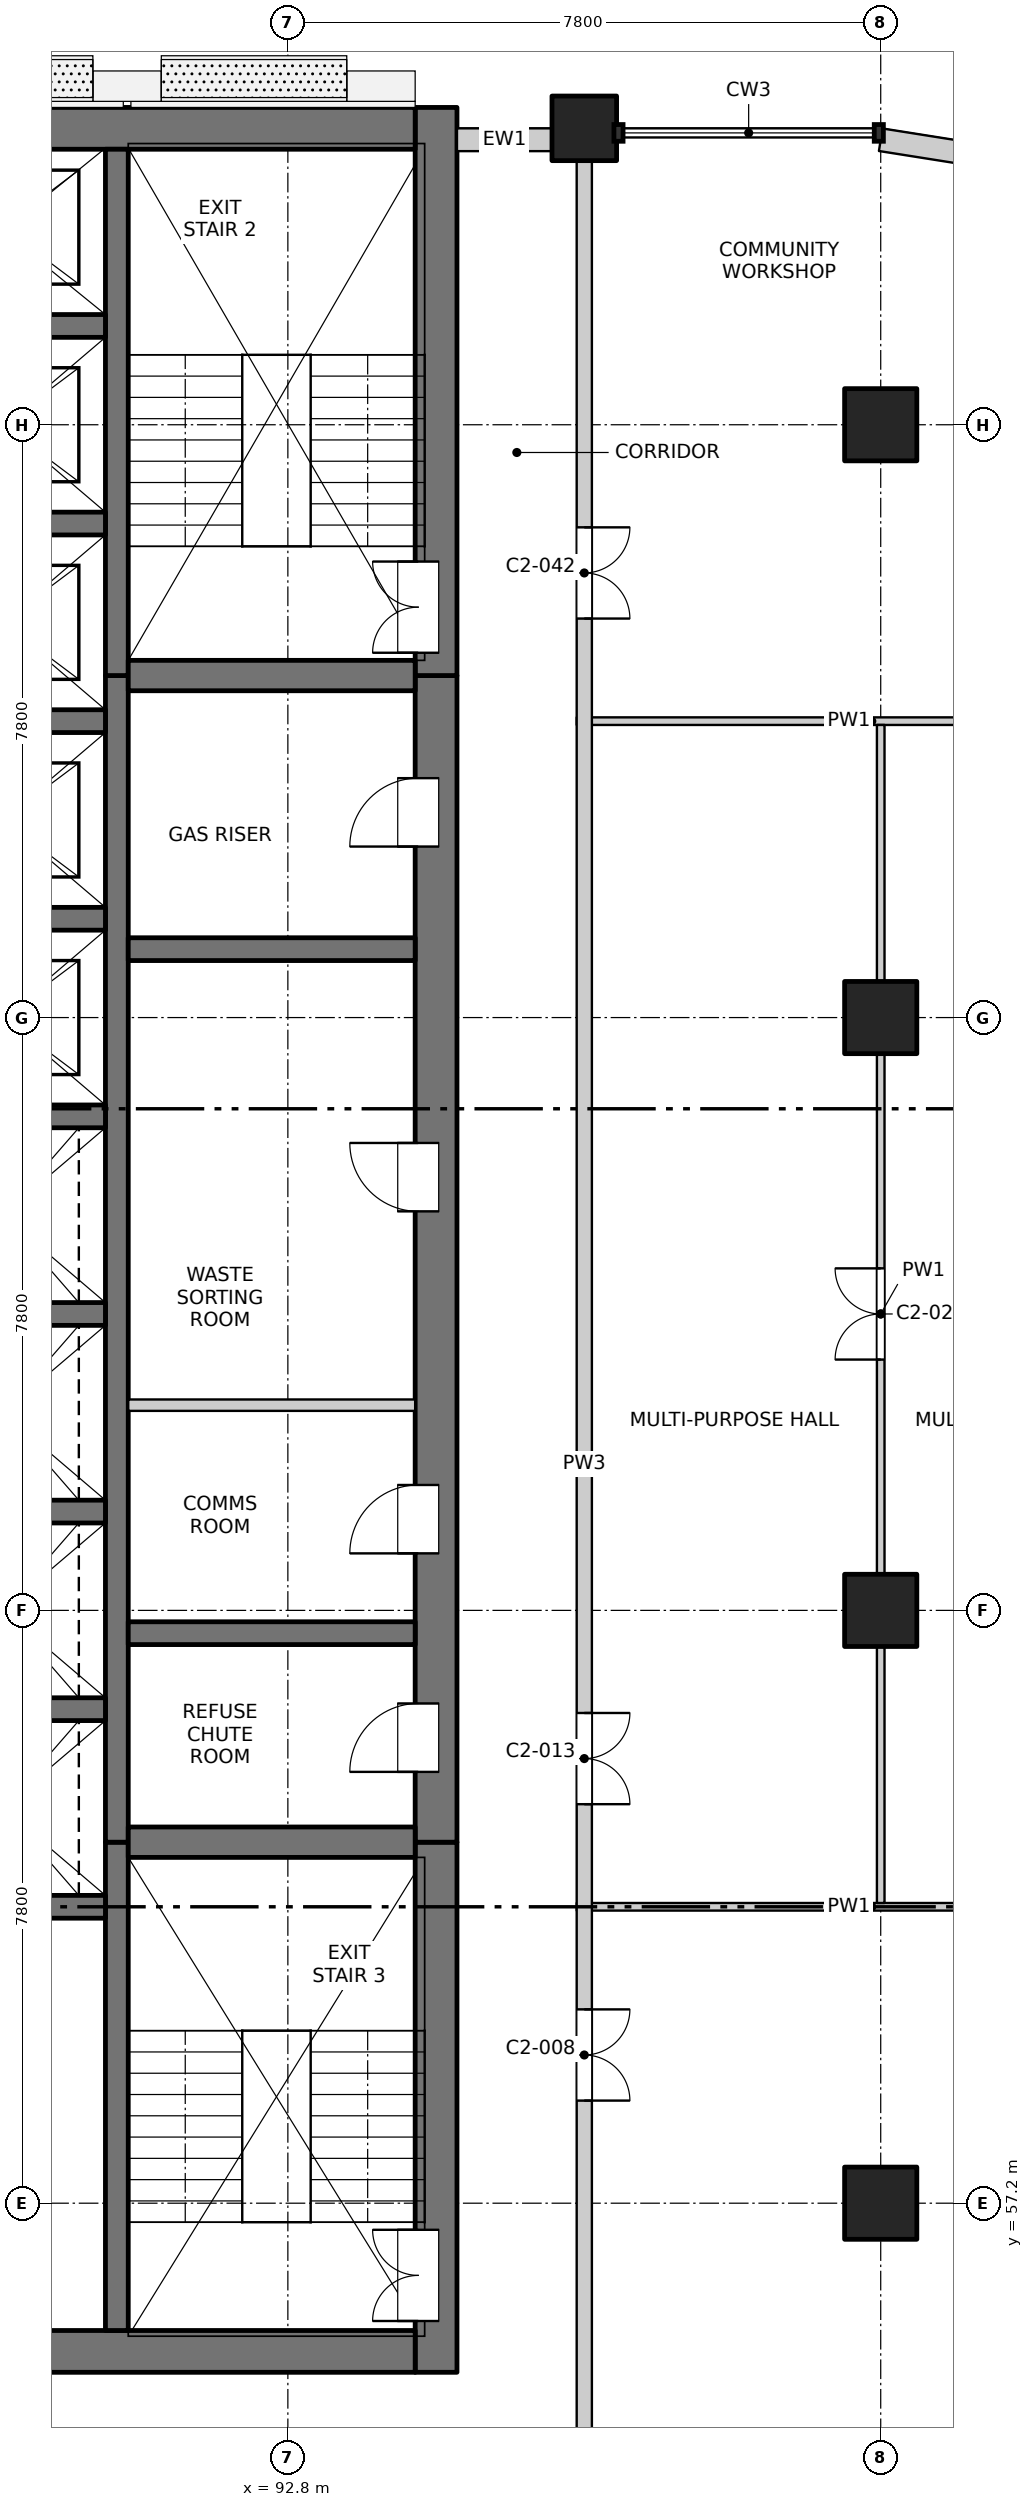
"""IFC4 building model, lengths in metres.
Left out: names, types, materials, properties, quantities, classifications, styles, units other than length and angle.
Written with IfcOpenShell. Run it as: python <this file> out.ifc"""

import sys

from ifc_helpers import new_model, si_unit, direction, frame, frame_2d, origin, origin_2d, place, context, subcontext, project, spatial, rectangle, extrude, element, fill, save


model = new_model("IFC4")
c1 = context("Model", 3, precision=1e-05, world=origin(), true_north=direction((0.0, 1.0)))
c2 = subcontext(c1, "Body", "Model", "MODEL_VIEW")
j1 = project(units=[si_unit("LENGTHUNIT", "METRE"), si_unit("PLANEANGLEUNIT", "RADIAN")], contexts=[c1])
p1 = place(None, origin())
s1 = spatial("IfcSite", under=j1, at=p1, CompositionType="ELEMENT")
p2 = place(p1, origin())
s2 = spatial("IfcBuilding", under=s1, at=p2, CompositionType="ELEMENT")
p3 = place(p2, frame((0.0, 0.0, 133.9)))
s3 = spatial("IfcBuildingStorey", under=s2, at=p3, CompositionType="ELEMENT", Elevation=133.9)
p4 = place(p3, frame((96.7, 84.5, -0.25), z_axis=(0.0, 0.0, 1.0), x_axis=(1.0, 0.0, 0.0)))
e1 = element("IfcColumn", 1, at=p4, inside=s3, PredefinedType="COLUMN", context=c2, shape_type="SweptSolid", body=[
    extrude(rectangle(XDim=0.85, YDim=0.85, at=origin_2d()), origin(), (0.0, 0.0, 1.0), 3.4),
])
for number, where, z_axis, x_axis in (
    (2, (100.6, 57.2, -0.25), (0.0, 0.0, 1.0), (1.0, 0.0, 0.0)),
    (3, (100.6, 65.0, -0.25), (0.0, 0.0, 1.0), (1.0, 0.0, 0.0)),
    (4, (100.6, 72.8, -0.25), (0.0, 0.0, 1.0), (1.0, 0.0, 0.0)),
    (5, (100.6, 80.6, -0.25), (0.0, 0.0, 1.0), (1.0, 0.0, 0.0)),
):
    element("IfcColumn", number, at=place(p3, frame(where, z_axis=z_axis, x_axis=x_axis)), inside=s3, PredefinedType="COLUMN", context=c2, shape_type="SweptSolid", body=[
        extrude(rectangle(XDim=0.95, YDim=0.95, at=origin_2d()), origin(), (0.0, 0.0, 1.0), 3.4),
    ])
p5 = place(p3, frame((94.75, 54.975, -0.25), z_axis=(0.0, 0.0, 1.0), x_axis=(0.0, 1.0, 0.0)))
e6 = element("IfcWall", 6, at=p5, inside=s3, PredefinedType="SOLIDWALL", context=c2, shape_type="SweptSolid", body=[
    extrude(rectangle(XDim=6.975, YDim=0.55, at=frame_2d((3.487, 0.0))), origin(), (0.0, 0.0, 1.0), 3.4),
])
p6 = place(p5, frame((0.675, 0.0, 0.25)))
e7 = element("IfcOpeningElement", 7, at=p6, cuts=e6, PredefinedType="OPENING", context=c2, shape_type="SweptSolid", body=[
    extrude(rectangle(XDim=1.2, YDim=2.1, at=frame_2d((0.6, 1.05))), frame((0.0, 0.285, 0.0), z_axis=(0.0, -1.0, 0.0), x_axis=(1.0, 0.0, 0.0)), (0.0, 0.0, 1.0), 0.57),
])
p7 = place(p3, frame((94.75, 61.95, -0.25), z_axis=(0.0, 0.0, 1.0), x_axis=(0.0, 1.0, 0.0)))
e8 = element("IfcWall", 8, at=p7, inside=s3, PredefinedType="SOLIDWALL", context=c2, shape_type="SweptSolid", body=[
    extrude(rectangle(XDim=15.35, YDim=0.55, at=frame_2d((7.675, 0.0))), origin(), (0.0, 0.0, 1.0), 3.4),
])
p8 = place(p7, frame((0.925, 0.0, 0.25)))
e9 = element("IfcOpeningElement", 9, at=p8, cuts=e8, PredefinedType="OPENING", context=c2, shape_type="SweptSolid", body=[
    extrude(rectangle(XDim=0.9, YDim=2.1, at=frame_2d((0.45, 1.05))), frame((0.0, 0.285, 0.0), z_axis=(0.0, -1.0, 0.0), x_axis=(1.0, 0.0, 0.0)), (0.0, 0.0, 1.0), 0.57),
])
p9 = place(p7, frame((3.8, 0.0, 0.25)))
e10 = element("IfcOpeningElement", 10, at=p9, cuts=e8, PredefinedType="OPENING", context=c2, shape_type="SweptSolid", body=[
    extrude(rectangle(XDim=0.9, YDim=2.1, at=frame_2d((0.45, 1.05))), frame((0.0, 0.285, 0.0), z_axis=(0.0, -1.0, 0.0), x_axis=(1.0, 0.0, 0.0)), (0.0, 0.0, 1.0), 0.57),
])
p10 = place(p7, frame((8.3, 0.0, 0.25)))
e11 = element("IfcOpeningElement", 11, at=p10, cuts=e8, PredefinedType="OPENING", context=c2, shape_type="SweptSolid", body=[
    extrude(rectangle(XDim=0.9, YDim=2.1, at=frame_2d((0.45, 1.05))), frame((0.0, 0.285, 0.0), z_axis=(0.0, -1.0, 0.0), x_axis=(1.0, 0.0, 0.0)), (0.0, 0.0, 1.0), 0.57),
])
p11 = place(p7, frame((13.1, 0.0, 0.25)))
e12 = element("IfcOpeningElement", 12, at=p11, cuts=e8, PredefinedType="OPENING", context=c2, shape_type="SweptSolid", body=[
    extrude(rectangle(XDim=0.9, YDim=2.1, at=frame_2d((0.45, 1.05))), frame((0.0, 0.285, 0.0), z_axis=(0.0, -1.0, 0.0), x_axis=(1.0, 0.0, 0.0)), (0.0, 0.0, 1.0), 0.57),
])
p12 = place(p3, frame((94.75, 77.3, -0.25), z_axis=(0.0, 0.0, 1.0), x_axis=(0.0, 1.0, 0.0)))
e13 = element("IfcWall", 13, at=p12, inside=s3, PredefinedType="SOLIDWALL", context=c2, shape_type="SweptSolid", body=[
    extrude(rectangle(XDim=7.475, YDim=0.55, at=frame_2d((3.737, 0.0))), origin(), (0.0, 0.0, 1.0), 3.4),
])
p13 = place(p12, frame((0.3, 0.0, 0.25)))
e14 = element("IfcOpeningElement", 14, at=p13, cuts=e13, PredefinedType="OPENING", context=c2, shape_type="SweptSolid", body=[
    extrude(rectangle(XDim=1.2, YDim=2.1, at=frame_2d((0.6, 1.05))), frame((0.0, 0.285, 0.0), z_axis=(0.0, -1.0, 0.0), x_axis=(1.0, 0.0, 0.0)), (0.0, 0.0, 1.0), 0.57),
])
p14 = place(p3, frame((75.525, 55.25, -0.25), z_axis=(0.0, 0.0, 1.0), x_axis=(1.0, 0.0, 0.0)))
e15 = element("IfcWall", 15, at=p14, inside=s3, PredefinedType="SOLIDWALL", context=c2, shape_type="SweptSolid", body=[
    extrude(rectangle(XDim=18.95, YDim=0.55, at=frame_2d((9.475, 0.0))), origin(), (0.0, 0.0, 1.0), 3.4),
])
p15 = place(p14, frame((8.725, 0.0, 0.25)))
e16 = element("IfcOpeningElement", 16, at=p15, cuts=e15, PredefinedType="OPENING", context=c2, shape_type="SweptSolid", body=[
    extrude(rectangle(XDim=1.5, YDim=2.1, at=frame_2d((0.75, 1.05))), frame((0.0, 0.285, 0.0), z_axis=(0.0, -1.0, 0.0), x_axis=(1.0, 0.0, 0.0)), (0.0, 0.0, 1.0), 0.57),
])
p16 = place(p3, frame((75.525, 84.5, -0.25), z_axis=(0.0, 0.0, 1.0), x_axis=(1.0, 0.0, 0.0)))
e17 = element("IfcWall", 17, at=p16, inside=s3, PredefinedType="SOLIDWALL", context=c2, shape_type="SweptSolid", body=[
    extrude(rectangle(XDim=18.95, YDim=0.55, at=frame_2d((9.475, 0.0))), origin(), (0.0, 0.0, 1.0), 3.4),
])
p17 = place(p3, frame((90.55, 55.525, -0.25), z_axis=(0.0, 0.0, 1.0), x_axis=(0.0, 1.0, 0.0)))
e18 = element("IfcWall", 18, at=p17, inside=s3, PredefinedType="SOLIDWALL", context=c2, shape_type="SweptSolid", body=[
    extrude(rectangle(XDim=6.425, YDim=0.3, at=frame_2d((3.212, 0.0))), origin(), (0.0, 0.0, 1.0), 3.4),
])
p18 = place(p3, frame((90.55, 61.95, -0.25), z_axis=(0.0, 0.0, 1.0), x_axis=(0.0, 1.0, 0.0)))
e19 = element("IfcWall", 19, at=p18, inside=s3, PredefinedType="SOLIDWALL", context=c2, shape_type="SweptSolid", body=[
    extrude(rectangle(XDim=15.35, YDim=0.3, at=frame_2d((7.675, 0.0))), origin(), (0.0, 0.0, 1.0), 3.4),
])
p19 = place(p3, frame((90.55, 77.3, -0.25), z_axis=(0.0, 0.0, 1.0), x_axis=(0.0, 1.0, 0.0)))
e20 = element("IfcWall", 20, at=p19, inside=s3, PredefinedType="SOLIDWALL", context=c2, shape_type="SweptSolid", body=[
    extrude(rectangle(XDim=6.925, YDim=0.3, at=frame_2d((3.462, 0.0))), origin(), (0.0, 0.0, 1.0), 3.4),
])
for number, where, z_axis, x_axis in (
    (21, (87.4, 61.1, -0.25), (0.0, 0.0, 1.0), (1.0, 0.0, 0.0)),
    (22, (87.4, 63.7, -0.25), (0.0, 0.0, 1.0), (1.0, 0.0, 0.0)),
    (23, (87.4, 66.3, -0.25), (0.0, 0.0, 1.0), (1.0, 0.0, 0.0)),
    (24, (87.4, 68.9, -0.25), (0.0, 0.0, 1.0), (1.0, 0.0, 0.0)),
    (25, (87.4, 71.5, -0.25), (0.0, 0.0, 1.0), (1.0, 0.0, 0.0)),
    (26, (87.4, 74.1, -0.25), (0.0, 0.0, 1.0), (1.0, 0.0, 0.0)),
    (27, (87.4, 76.7, -0.25), (0.0, 0.0, 1.0), (1.0, 0.0, 0.0)),
    (28, (87.4, 79.3, -0.25), (0.0, 0.0, 1.0), (1.0, 0.0, 0.0)),
    (29, (87.4, 81.9, -0.25), (0.0, 0.0, 1.0), (1.0, 0.0, 0.0)),
):
    element("IfcWall", number, at=place(p3, frame(where, z_axis=z_axis, x_axis=x_axis)), inside=s3, PredefinedType="SOLIDWALL", context=c2, shape_type="SweptSolid", body=[
        extrude(rectangle(XDim=3.0, YDim=0.3, at=frame_2d((1.5, 0.0))), origin(), (0.0, 0.0, 1.0), 3.4),
    ])
p20 = place(p3, frame((90.7, 61.95, -0.25), z_axis=(0.0, 0.0, 1.0), x_axis=(1.0, 0.0, 0.0)))
e30 = element("IfcWall", 30, at=p20, inside=s3, PredefinedType="SOLIDWALL", context=c2, shape_type="SweptSolid", body=[
    extrude(rectangle(XDim=3.775, YDim=0.4, at=frame_2d((1.888, 0.0))), origin(), (0.0, 0.0, 1.0), 3.4),
])
for number, where, z_axis, x_axis in (
    (31, (90.7, 64.7, -0.25), (0.0, 0.0, 1.0), (1.0, 0.0, 0.0)),
    (32, (90.7, 73.7, -0.25), (0.0, 0.0, 1.0), (1.0, 0.0, 0.0)),
):
    element("IfcWall", number, at=place(p3, frame(where, z_axis=z_axis, x_axis=x_axis)), inside=s3, PredefinedType="SOLIDWALL", context=c2, shape_type="SweptSolid", body=[
        extrude(rectangle(XDim=3.775, YDim=0.3, at=frame_2d((1.888, 0.0))), origin(), (0.0, 0.0, 1.0), 3.4),
    ])
p21 = place(p3, frame((90.7, 77.3, -0.25), z_axis=(0.0, 0.0, 1.0), x_axis=(1.0, 0.0, 0.0)))
e33 = element("IfcWall", 33, at=p21, inside=s3, PredefinedType="SOLIDWALL", context=c2, shape_type="SweptSolid", body=[
    extrude(rectangle(XDim=3.775, YDim=0.4, at=frame_2d((1.888, 0.0))), origin(), (0.0, 0.0, 1.0), 3.4),
])
p22 = place(p3, frame((95.025, 84.35, 0.0), z_axis=(0.0, 0.0, 1.0), x_axis=(1.0, 0.0, 0.0)))
e34 = element("IfcWall", 34, at=p22, inside=s3, PredefinedType="SOLIDWALL", context=c2, shape_type="SweptSolid", body=[
    extrude(rectangle(XDim=1.25, YDim=0.3, at=frame_2d((0.625, 0.0))), origin(), (0.0, 0.0, 1.0), 2.7),
])
p23 = place(p3, frame((101.759, 84.167, 0.0), z_axis=(0.0, 0.0, 1.0), x_axis=(-0.987678452879, 0.156496880861, 0.0)))
e35 = element("IfcWall", 35, at=p23, inside=s3, PredefinedType="SOLIDWALL", context=c2, shape_type="SweptSolid", body=[
    extrude(rectangle(XDim=1.173, YDim=0.3, at=frame_2d((0.586, 0.0))), origin(), (0.0, 0.0, 1.0), 2.7),
])
p24 = place(p3, frame((96.6, 61.1, 0.0), z_axis=(0.0, 0.0, 1.0), x_axis=(1.0, 0.0, 0.0)))
e36 = element("IfcWall", 36, at=p24, inside=s3, PredefinedType="PARTITIONING", context=c2, shape_type="SweptSolid", body=[
    extrude(rectangle(XDim=7.765, YDim=0.1, at=frame_2d((3.882, 0.0))), origin(), (0.0, 0.0, 1.0), 2.55),
])
p25 = place(p3, frame((90.7, 67.7, 0.0), z_axis=(0.0, 0.0, 1.0), x_axis=(1.0, 0.0, 0.0)))
e37 = element("IfcWall", 37, at=p25, inside=s3, PredefinedType="PARTITIONING", context=c2, shape_type="SweptSolid", body=[
    extrude(rectangle(XDim=3.775, YDim=0.15, at=frame_2d((1.887, 0.0))), origin(), (0.0, 0.0, 1.0), 3.15),
])
p26 = place(p3, frame((96.6, 76.7, 0.0), z_axis=(0.0, 0.0, 1.0), x_axis=(1.0, 0.0, 0.0)))
e38 = element("IfcWall", 38, at=p26, inside=s3, PredefinedType="PARTITIONING", context=c2, shape_type="SweptSolid", body=[
    extrude(rectangle(XDim=7.765, YDim=0.1, at=frame_2d((3.882, 0.0))), origin(), (0.0, 0.0, 1.0), 2.55),
])
p27 = place(p3, frame((96.7, 49.5, 0.0), z_axis=(0.0, 0.0, 1.0), x_axis=(0.0, 1.0, 0.0)))
e39 = element("IfcWall", 39, at=p27, inside=s3, PredefinedType="PARTITIONING", context=c2, shape_type="SweptSolid", body=[
    extrude(rectangle(XDim=34.865, YDim=0.2, at=frame_2d((17.433, 0.0))), origin(), (0.0, 0.0, 1.0), 3.15),
])
p28 = place(p27, frame((9.05, 0.0, 0.0)))
e40 = element("IfcOpeningElement", 40, at=p28, cuts=e39, PredefinedType="OPENING", context=c2, shape_type="SweptSolid", body=[
    extrude(rectangle(XDim=1.2, YDim=2.1, at=frame_2d((0.6, 1.05))), frame((0.0, 0.11, 0.0), z_axis=(0.0, -1.0, 0.0), x_axis=(1.0, 0.0, 0.0)), (0.0, 0.0, 1.0), 0.22),
])
p29 = place(p27, frame((12.95, 0.0, 0.0)))
e41 = element("IfcOpeningElement", 41, at=p29, cuts=e39, PredefinedType="OPENING", context=c2, shape_type="SweptSolid", body=[
    extrude(rectangle(XDim=1.2, YDim=2.1, at=frame_2d((0.6, 1.05))), frame((0.0, 0.11, 0.0), z_axis=(0.0, -1.0, 0.0), x_axis=(1.0, 0.0, 0.0)), (0.0, 0.0, 1.0), 0.22),
])
p30 = place(p27, frame((28.55, 0.0, 0.0)))
e42 = element("IfcOpeningElement", 42, at=p30, cuts=e39, PredefinedType="OPENING", context=c2, shape_type="SweptSolid", body=[
    extrude(rectangle(XDim=1.2, YDim=2.1, at=frame_2d((0.6, 1.05))), frame((0.0, 0.11, 0.0), z_axis=(0.0, -1.0, 0.0), x_axis=(1.0, 0.0, 0.0)), (0.0, 0.0, 1.0), 0.22),
])
p31 = place(p3, frame((100.6, 61.15, 0.0), z_axis=(0.0, 0.0, 1.0), x_axis=(0.0, 1.0, 0.0)))
e43 = element("IfcWall", 43, at=p31, inside=s3, PredefinedType="PARTITIONING", context=c2, shape_type="SweptSolid", body=[
    extrude(rectangle(XDim=15.5, YDim=0.1, at=frame_2d((7.75, 0.0))), origin(), (0.0, 0.0, 1.0), 3.15),
])
p32 = place(p31, frame((7.15, 0.0, 0.0)))
e44 = element("IfcOpeningElement", 44, at=p32, cuts=e43, PredefinedType="OPENING", context=c2, shape_type="SweptSolid", body=[
    extrude(rectangle(XDim=1.2, YDim=2.1, at=frame_2d((0.6, 1.05))), frame((0.0, 0.06, 0.0), z_axis=(0.0, -1.0, 0.0), x_axis=(1.0, 0.0, 0.0)), (0.0, 0.0, 1.0), 0.12),
])
p33 = place(p6, origin())
e45 = element("IfcDoor", 45, at=p33, inside=s3, OperationType="DOUBLE_DOOR_SINGLE_SWING", PredefinedType="DOOR", context=c2, shape_type="SweptSolid", body=[
    extrude(rectangle(XDim=1.2, YDim=2.1, at=frame_2d((0.6, 1.05))), frame((0.0, 0.26, 0.0), z_axis=(0.0, -1.0, 0.0), x_axis=(1.0, 0.0, 0.0)), (0.0, 0.0, 1.0), 0.05),
])
fill(e7, e45)
p34 = place(p28, origin())
e46 = element("IfcDoor", 46, at=p34, inside=s3, OperationType="DOUBLE_DOOR_SINGLE_SWING", PredefinedType="DOOR", context=c2, shape_type="SweptSolid", body=[
    extrude(rectangle(XDim=1.2, YDim=2.1, at=frame_2d((0.6, 1.05))), frame((0.0, 0.025, 0.0), z_axis=(0.0, -1.0, 0.0), x_axis=(1.0, 0.0, 0.0)), (0.0, 0.0, 1.0), 0.05),
])
fill(e40, e46)
p35 = place(p29, origin())
e47 = element("IfcDoor", 47, at=p35, inside=s3, OperationType="DOUBLE_DOOR_SINGLE_SWING", PredefinedType="DOOR", context=c2, shape_type="SweptSolid", body=[
    extrude(rectangle(XDim=1.2, YDim=2.1, at=frame_2d((0.6, 1.05))), frame((0.0, 0.025, 0.0), z_axis=(0.0, -1.0, 0.0), x_axis=(1.0, 0.0, 0.0)), (0.0, 0.0, 1.0), 0.05),
])
fill(e41, e47)
p36 = place(p8, origin())
e48 = element("IfcDoor", 48, at=p36, inside=s3, OperationType="SINGLE_SWING_LEFT", PredefinedType="DOOR", context=c2, shape_type="SweptSolid", body=[
    extrude(rectangle(XDim=0.9, YDim=2.1, at=frame_2d((0.45, 1.05))), frame((0.0, 0.26, 0.0), z_axis=(0.0, -1.0, 0.0), x_axis=(1.0, 0.0, 0.0)), (0.0, 0.0, 1.0), 0.05),
])
fill(e9, e48)
p37 = place(p9, origin())
e49 = element("IfcDoor", 49, at=p37, inside=s3, OperationType="SINGLE_SWING_LEFT", PredefinedType="DOOR", context=c2, shape_type="SweptSolid", body=[
    extrude(rectangle(XDim=0.9, YDim=2.1, at=frame_2d((0.45, 1.05))), frame((0.0, 0.26, 0.0), z_axis=(0.0, -1.0, 0.0), x_axis=(1.0, 0.0, 0.0)), (0.0, 0.0, 1.0), 0.05),
])
fill(e10, e49)
p38 = place(p32, origin())
e50 = element("IfcDoor", 50, at=p38, inside=s3, OperationType="DOUBLE_DOOR_SINGLE_SWING", PredefinedType="DOOR", context=c2, shape_type="SweptSolid", body=[
    extrude(rectangle(XDim=1.2, YDim=2.1, at=frame_2d((0.6, 1.05))), frame((0.0, 0.025, 0.0), z_axis=(0.0, -1.0, 0.0), x_axis=(1.0, 0.0, 0.0)), (0.0, 0.0, 1.0), 0.05),
])
fill(e44, e50)
p39 = place(p10, origin())
e51 = element("IfcDoor", 51, at=p39, inside=s3, OperationType="SINGLE_SWING_RIGHT", PredefinedType="DOOR", context=c2, shape_type="SweptSolid", body=[
    extrude(rectangle(XDim=0.9, YDim=2.1, at=frame_2d((0.45, 1.05))), frame((0.0, 0.26, 0.0), z_axis=(0.0, -1.0, 0.0), x_axis=(1.0, 0.0, 0.0)), (0.0, 0.0, 1.0), 0.05),
])
fill(e11, e51)
p40 = place(p11, origin())
e52 = element("IfcDoor", 52, at=p40, inside=s3, OperationType="SINGLE_SWING_LEFT", PredefinedType="DOOR", context=c2, shape_type="SweptSolid", body=[
    extrude(rectangle(XDim=0.9, YDim=2.1, at=frame_2d((0.45, 1.05))), frame((0.0, 0.26, 0.0), z_axis=(0.0, -1.0, 0.0), x_axis=(1.0, 0.0, 0.0)), (0.0, 0.0, 1.0), 0.05),
])
fill(e12, e52)
p41 = place(p13, origin())
e53 = element("IfcDoor", 53, at=p41, inside=s3, OperationType="DOUBLE_DOOR_SINGLE_SWING", PredefinedType="DOOR", context=c2, shape_type="SweptSolid", body=[
    extrude(rectangle(XDim=1.2, YDim=2.1, at=frame_2d((0.6, 1.05))), frame((0.0, 0.26, 0.0), z_axis=(0.0, -1.0, 0.0), x_axis=(1.0, 0.0, 0.0)), (0.0, 0.0, 1.0), 0.05),
])
fill(e14, e53)
p42 = place(p30, origin())
e54 = element("IfcDoor", 54, at=p42, inside=s3, OperationType="DOUBLE_DOOR_SINGLE_SWING", PredefinedType="DOOR", context=c2, shape_type="SweptSolid", body=[
    extrude(rectangle(XDim=1.2, YDim=2.1, at=frame_2d((0.6, 1.05))), frame((0.0, 0.025, 0.0), z_axis=(0.0, -1.0, 0.0), x_axis=(1.0, 0.0, 0.0)), (0.0, 0.0, 1.0), 0.05),
])
fill(e42, e54)
save(model, sys.argv[1])
